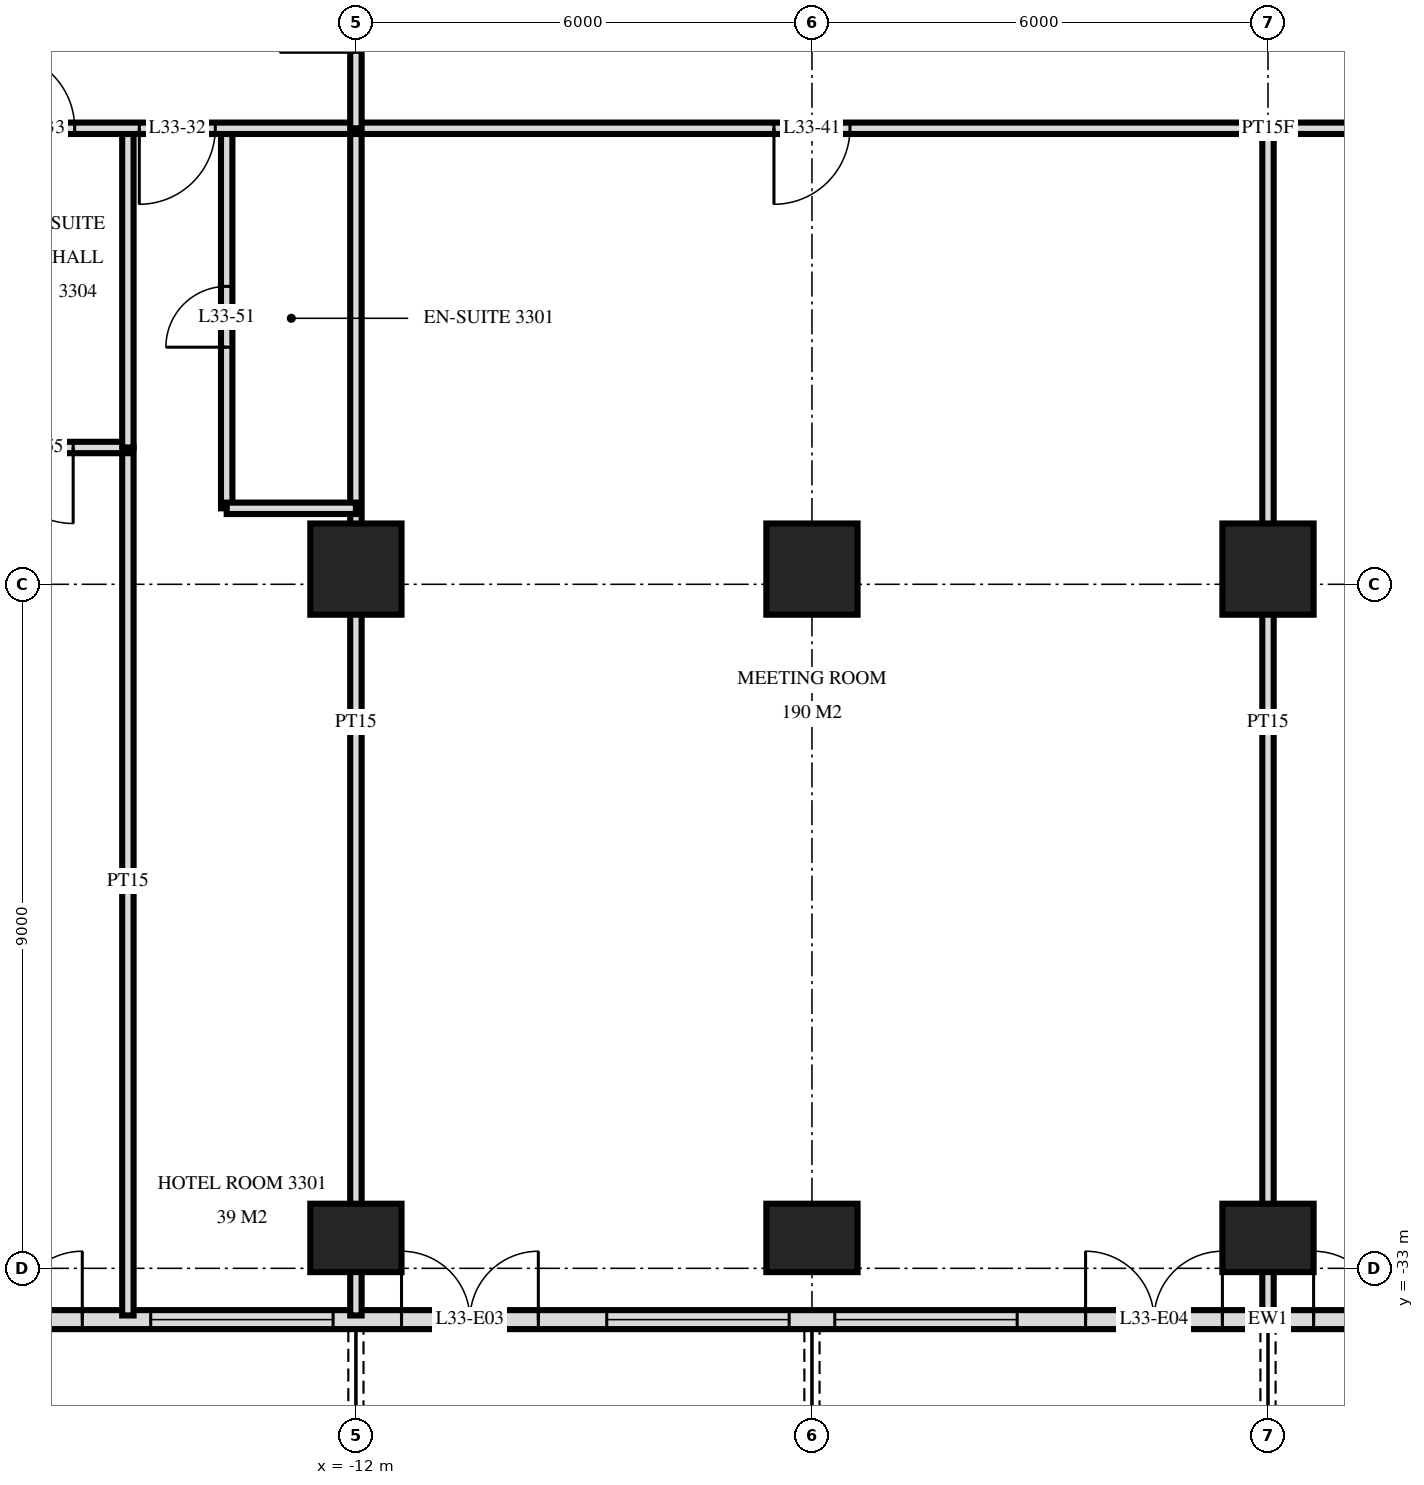
"""IFC4 building model, lengths in metres.
Left out: names, types, materials, properties, quantities, classifications, styles, units other than length and angle.
Written with IfcOpenShell. Run it as: python <this file> out.ifc"""

import sys

from ifc_helpers import new_model, si_unit, direction, frame, frame_2d, origin, origin_2d, place, context, subcontext, project, spatial, rectangle, extrude, element, fill, save


model = new_model("IFC4")
c1 = context("Model", 3, precision=1e-05, world=origin(), true_north=direction((0.0, 1.0)))
c2 = subcontext(c1, "Body", "Model", "MODEL_VIEW")
j1 = project(units=[si_unit("LENGTHUNIT", "METRE"), si_unit("PLANEANGLEUNIT", "RADIAN")], contexts=[c1])
p1 = place(None, origin())
s1 = spatial("IfcSite", under=j1, at=p1, CompositionType="ELEMENT")
p2 = place(p1, origin())
s2 = spatial("IfcBuilding", under=s1, at=p2, CompositionType="ELEMENT")
p3 = place(p2, frame((0.0, 0.0, 130.8)))
s3 = spatial("IfcBuildingStorey", under=s2, at=p3, CompositionType="ELEMENT", Elevation=130.8)
p4 = place(p3, frame((-12.0, -32.6, 0.0), z_axis=(0.0, 0.0, 1.0), x_axis=(1.0, 0.0, 0.0)))
e1 = element("IfcColumn", 1, at=p4, inside=s3, PredefinedType="COLUMN", context=c2, shape_type="SweptSolid", body=[
    extrude(rectangle(XDim=1.2, YDim=0.9, at=origin_2d()), origin(), (0.0, 0.0, 1.0), 3.6),
])
p5 = place(p3, frame((-12.0, -23.8, 0.0), z_axis=(0.0, 0.0, 1.0), x_axis=(1.0, 0.0, 0.0)))
e2 = element("IfcColumn", 2, at=p5, inside=s3, PredefinedType="COLUMN", context=c2, shape_type="SweptSolid", body=[
    extrude(rectangle(XDim=1.2, YDim=1.2, at=origin_2d()), origin(), (0.0, 0.0, 1.0), 3.6),
])
p6 = place(p3, frame((-6.0, -32.6, 0.0), z_axis=(0.0, 0.0, 1.0), x_axis=(1.0, 0.0, 0.0)))
e3 = element("IfcColumn", 3, at=p6, inside=s3, PredefinedType="COLUMN", context=c2, shape_type="SweptSolid", body=[
    extrude(rectangle(XDim=1.2, YDim=0.9, at=origin_2d()), origin(), (0.0, 0.0, 1.0), 3.6),
])
p7 = place(p3, frame((-6.0, -23.8, 0.0), z_axis=(0.0, 0.0, 1.0), x_axis=(1.0, 0.0, 0.0)))
e4 = element("IfcColumn", 4, at=p7, inside=s3, PredefinedType="COLUMN", context=c2, shape_type="SweptSolid", body=[
    extrude(rectangle(XDim=1.2, YDim=1.2, at=origin_2d()), origin(), (0.0, 0.0, 1.0), 3.6),
])
p8 = place(p3, frame((0.0, -32.6, 0.0), z_axis=(0.0, 0.0, 1.0), x_axis=(1.0, 0.0, 0.0)))
e5 = element("IfcColumn", 5, at=p8, inside=s3, PredefinedType="COLUMN", context=c2, shape_type="SweptSolid", body=[
    extrude(rectangle(XDim=1.2, YDim=0.9, at=origin_2d()), origin(), (0.0, 0.0, 1.0), 3.6),
])
p9 = place(p3, frame((0.0, -23.8, 0.0), z_axis=(0.0, 0.0, 1.0), x_axis=(1.0, 0.0, 0.0)))
e6 = element("IfcColumn", 6, at=p9, inside=s3, PredefinedType="COLUMN", context=c2, shape_type="SweptSolid", body=[
    extrude(rectangle(XDim=1.2, YDim=1.2, at=origin_2d()), origin(), (0.0, 0.0, 1.0), 3.6),
])
p10 = place(p3, frame((-23.675, -33.675, 0.0), z_axis=(0.0, 0.0, 1.0), x_axis=(1.0, 0.0, 0.0)))
e7 = element("IfcWall", 7, at=p10, inside=s3, PredefinedType="SOLIDWALL", context=c2, shape_type="SweptSolid", body=[
    extrude(rectangle(XDim=47.351, YDim=0.25, at=frame_2d((23.675, 0.0))), origin(), (0.0, 0.0, 1.0), 3.32),
])
p11 = place(p10, frame((3.425, 0.0, 0.0)))
e8 = element("IfcOpeningElement", 8, at=p11, cuts=e7, PredefinedType="OPENING", context=c2, shape_type="SweptSolid", body=[
    extrude(rectangle(XDim=1.8, YDim=2.4, at=frame_2d((0.9, 1.2))), frame((0.0, 0.135, 0.0), z_axis=(0.0, -1.0, 0.0), x_axis=(1.0, 0.0, 0.0)), (0.0, 0.0, 1.0), 0.27),
])
p12 = place(p10, frame((6.275, 0.0, 0.0)))
e9 = element("IfcOpeningElement", 9, at=p12, cuts=e7, PredefinedType="OPENING", context=c2, shape_type="SweptSolid", body=[
    extrude(rectangle(XDim=1.8, YDim=2.4, at=frame_2d((0.9, 1.2))), frame((0.0, 0.135, 0.0), z_axis=(0.0, -1.0, 0.0), x_axis=(1.0, 0.0, 0.0)), (0.0, 0.0, 1.0), 0.27),
])
p13 = place(p10, frame((8.975, 0.0, 0.3)))
e10 = element("IfcOpeningElement", 10, at=p13, cuts=e7, PredefinedType="OPENING", context=c2, shape_type="SweptSolid", body=[
    extrude(rectangle(XDim=2.4, YDim=2.1, at=frame_2d((1.2, 1.05))), frame((0.0, 0.135, 0.0), z_axis=(0.0, -1.0, 0.0), x_axis=(1.0, 0.0, 0.0)), (0.0, 0.0, 1.0), 0.27),
])
p14 = place(p10, frame((12.275, 0.0, 0.0)))
e11 = element("IfcOpeningElement", 11, at=p14, cuts=e7, PredefinedType="OPENING", context=c2, shape_type="SweptSolid", body=[
    extrude(rectangle(XDim=1.8, YDim=2.4, at=frame_2d((0.9, 1.2))), frame((0.0, 0.135, 0.0), z_axis=(0.0, -1.0, 0.0), x_axis=(1.0, 0.0, 0.0)), (0.0, 0.0, 1.0), 0.27),
])
p15 = place(p10, frame((14.975, 0.0, 0.3)))
e12 = element("IfcOpeningElement", 12, at=p15, cuts=e7, PredefinedType="OPENING", context=c2, shape_type="SweptSolid", body=[
    extrude(rectangle(XDim=2.4, YDim=2.1, at=frame_2d((1.2, 1.05))), frame((0.0, 0.135, 0.0), z_axis=(0.0, -1.0, 0.0), x_axis=(1.0, 0.0, 0.0)), (0.0, 0.0, 1.0), 0.27),
])
p16 = place(p10, frame((17.975, 0.0, 0.3)))
e13 = element("IfcOpeningElement", 13, at=p16, cuts=e7, PredefinedType="OPENING", context=c2, shape_type="SweptSolid", body=[
    extrude(rectangle(XDim=2.4, YDim=2.1, at=frame_2d((1.2, 1.05))), frame((0.0, 0.135, 0.0), z_axis=(0.0, -1.0, 0.0), x_axis=(1.0, 0.0, 0.0)), (0.0, 0.0, 1.0), 0.27),
])
p17 = place(p10, frame((21.275, 0.0, 0.0)))
e14 = element("IfcOpeningElement", 14, at=p17, cuts=e7, PredefinedType="OPENING", context=c2, shape_type="SweptSolid", body=[
    extrude(rectangle(XDim=1.8, YDim=2.4, at=frame_2d((0.9, 1.2))), frame((0.0, 0.135, 0.0), z_axis=(0.0, -1.0, 0.0), x_axis=(1.0, 0.0, 0.0)), (0.0, 0.0, 1.0), 0.27),
])
p18 = place(p10, frame((24.275, 0.0, 0.0)))
e15 = element("IfcOpeningElement", 15, at=p18, cuts=e7, PredefinedType="OPENING", context=c2, shape_type="SweptSolid", body=[
    extrude(rectangle(XDim=1.8, YDim=2.4, at=frame_2d((0.9, 1.2))), frame((0.0, 0.135, 0.0), z_axis=(0.0, -1.0, 0.0), x_axis=(1.0, 0.0, 0.0)), (0.0, 0.0, 1.0), 0.27),
])
p19 = place(p10, frame((26.975, 0.0, 0.3)))
e16 = element("IfcOpeningElement", 16, at=p19, cuts=e7, PredefinedType="OPENING", context=c2, shape_type="SweptSolid", body=[
    extrude(rectangle(XDim=2.4, YDim=2.1, at=frame_2d((1.2, 1.05))), frame((0.0, 0.135, 0.0), z_axis=(0.0, -1.0, 0.0), x_axis=(1.0, 0.0, 0.0)), (0.0, 0.0, 1.0), 0.27),
])
p20 = place(p10, frame((30.275, 0.0, 0.0)))
e17 = element("IfcOpeningElement", 17, at=p20, cuts=e7, PredefinedType="OPENING", context=c2, shape_type="SweptSolid", body=[
    extrude(rectangle(XDim=1.8, YDim=2.4, at=frame_2d((0.9, 1.2))), frame((0.0, 0.135, 0.0), z_axis=(0.0, -1.0, 0.0), x_axis=(1.0, 0.0, 0.0)), (0.0, 0.0, 1.0), 0.27),
])
p21 = place(p10, frame((32.975, 0.0, 0.3)))
e18 = element("IfcOpeningElement", 18, at=p21, cuts=e7, PredefinedType="OPENING", context=c2, shape_type="SweptSolid", body=[
    extrude(rectangle(XDim=2.4, YDim=2.1, at=frame_2d((1.2, 1.05))), frame((0.0, 0.135, 0.0), z_axis=(0.0, -1.0, 0.0), x_axis=(1.0, 0.0, 0.0)), (0.0, 0.0, 1.0), 0.27),
])
p22 = place(p10, frame((36.275, 0.0, 0.0)))
e19 = element("IfcOpeningElement", 19, at=p22, cuts=e7, PredefinedType="OPENING", context=c2, shape_type="SweptSolid", body=[
    extrude(rectangle(XDim=1.8, YDim=2.4, at=frame_2d((0.9, 1.2))), frame((0.0, 0.135, 0.0), z_axis=(0.0, -1.0, 0.0), x_axis=(1.0, 0.0, 0.0)), (0.0, 0.0, 1.0), 0.27),
])
p23 = place(p10, frame((38.975, 0.0, 0.3)))
e20 = element("IfcOpeningElement", 20, at=p23, cuts=e7, PredefinedType="OPENING", context=c2, shape_type="SweptSolid", body=[
    extrude(rectangle(XDim=2.4, YDim=2.1, at=frame_2d((1.2, 1.05))), frame((0.0, 0.135, 0.0), z_axis=(0.0, -1.0, 0.0), x_axis=(1.0, 0.0, 0.0)), (0.0, 0.0, 1.0), 0.27),
])
p24 = place(p10, frame((41.975, 0.0, 0.3)))
e21 = element("IfcOpeningElement", 21, at=p24, cuts=e7, PredefinedType="OPENING", context=c2, shape_type="SweptSolid", body=[
    extrude(rectangle(XDim=2.4, YDim=2.1, at=frame_2d((1.2, 1.05))), frame((0.0, 0.135, 0.0), z_axis=(0.0, -1.0, 0.0), x_axis=(1.0, 0.0, 0.0)), (0.0, 0.0, 1.0), 0.27),
])
p25 = place(p10, frame((45.125, 0.0, 0.0)))
e22 = element("IfcOpeningElement", 22, at=p25, cuts=e7, PredefinedType="OPENING", context=c2, shape_type="SweptSolid", body=[
    extrude(rectangle(XDim=1.8, YDim=2.4, at=frame_2d((0.9, 1.2))), frame((0.0, 0.135, 0.0), z_axis=(0.0, -1.0, 0.0), x_axis=(1.0, 0.0, 0.0)), (0.0, 0.0, 1.0), 0.27),
])
p26 = place(p3, frame((0.0, -33.62, 0.0), z_axis=(0.0, 0.0, 1.0), x_axis=(0.0, 1.0, 0.0)))
e23 = element("IfcWall", 23, at=p26, inside=s3, PredefinedType="PARTITIONING", context=c2, shape_type="SweptSolid", body=[
    extrude(rectangle(XDim=15.62, YDim=0.15, at=frame_2d((7.81, 0.0))), origin(), (0.0, 0.0, 1.0), 3.32),
])
p27 = place(p3, frame((-12.0, -18.0, 0.0), z_axis=(0.0, 0.0, 1.0), x_axis=(0.0, 1.0, 0.0)))
e24 = element("IfcWall", 24, at=p27, inside=s3, PredefinedType="PARTITIONING", context=c2, shape_type="SweptSolid", body=[
    extrude(rectangle(XDim=2.95, YDim=0.15, at=frame_2d((1.475, 0.0))), origin(), (0.0, 0.0, 1.0), 3.32),
])
p28 = place(p27, frame((1.0, 0.0, 0.0)))
e25 = element("IfcOpeningElement", 25, at=p28, cuts=e24, PredefinedType="OPENING", context=c2, shape_type="SweptSolid", body=[
    extrude(rectangle(XDim=1.0, YDim=2.1, at=frame_2d((0.5, 1.05))), frame((0.0, 0.085, 0.0), z_axis=(0.0, -1.0, 0.0), x_axis=(1.0, 0.0, 0.0)), (0.0, 0.0, 1.0), 0.17),
])
p29 = place(p3, frame((-12.0, -33.62, 0.0), z_axis=(0.0, 0.0, 1.0), x_axis=(0.0, 1.0, 0.0)))
e26 = element("IfcWall", 26, at=p29, inside=s3, PredefinedType="PARTITIONING", context=c2, shape_type="SweptSolid", body=[
    extrude(rectangle(XDim=15.62, YDim=0.15, at=frame_2d((7.81, 0.0))), origin(), (0.0, 0.0, 1.0), 3.32),
])
p30 = place(p3, frame((-13.7, -23.0, 0.0), z_axis=(0.0, 0.0, 1.0), x_axis=(0.0, 1.0, 0.0)))
e27 = element("IfcWall", 27, at=p30, inside=s3, PredefinedType="PARTITIONING", context=c2, shape_type="SweptSolid", body=[
    extrude(rectangle(XDim=5.0, YDim=0.15, at=frame_2d((2.5, 0.0))), origin(), (0.0, 0.0, 1.0), 3.32),
])
p31 = place(p30, frame((2.12, 0.0, 0.0)))
e28 = element("IfcOpeningElement", 28, at=p31, cuts=e27, PredefinedType="OPENING", context=c2, shape_type="SweptSolid", body=[
    extrude(rectangle(XDim=0.8, YDim=2.1, at=frame_2d((0.4, 1.05))), frame((0.0, 0.085, 0.0), z_axis=(0.0, -1.0, 0.0), x_axis=(1.0, 0.0, 0.0)), (0.0, 0.0, 1.0), 0.17),
])
p32 = place(p3, frame((-15.0, -22.2, 0.0), z_axis=(0.0, 0.0, 1.0), x_axis=(0.0, 1.0, 0.0)))
e29 = element("IfcWall", 29, at=p32, inside=s3, PredefinedType="PARTITIONING", context=c2, shape_type="SweptSolid", body=[
    extrude(rectangle(XDim=4.2, YDim=0.15, at=frame_2d((2.1, 0.0))), origin(), (0.0, 0.0, 1.0), 3.32),
])
p33 = place(p3, frame((-15.0, -33.62, 0.0), z_axis=(0.0, 0.0, 1.0), x_axis=(0.0, 1.0, 0.0)))
e30 = element("IfcWall", 30, at=p33, inside=s3, PredefinedType="PARTITIONING", context=c2, shape_type="SweptSolid", body=[
    extrude(rectangle(XDim=11.42, YDim=0.15, at=frame_2d((5.71, 0.0))), origin(), (0.0, 0.0, 1.0), 3.32),
])
p34 = place(p3, frame((-13.7, -23.0, 0.0), z_axis=(0.0, 0.0, 1.0), x_axis=(1.0, 0.0, 0.0)))
e31 = element("IfcWall", 31, at=p34, inside=s3, PredefinedType="PARTITIONING", context=c2, shape_type="SweptSolid", body=[
    extrude(rectangle(XDim=1.7, YDim=0.15, at=frame_2d((0.85, 0.0))), origin(), (0.0, 0.0, 1.0), 3.32),
])
p35 = place(p3, frame((-17.4, -22.2, 0.0), z_axis=(0.0, 0.0, 1.0), x_axis=(1.0, 0.0, 0.0)))
e32 = element("IfcWall", 32, at=p35, inside=s3, PredefinedType="PARTITIONING", context=c2, shape_type="SweptSolid", body=[
    extrude(rectangle(XDim=2.4, YDim=0.15, at=frame_2d((1.2, 0.0))), origin(), (0.0, 0.0, 1.0), 3.32),
])
p36 = place(p35, frame((0.68, 0.0, 0.0)))
e33 = element("IfcOpeningElement", 33, at=p36, cuts=e32, PredefinedType="OPENING", context=c2, shape_type="SweptSolid", body=[
    extrude(rectangle(XDim=1.0, YDim=2.1, at=frame_2d((0.5, 1.05))), frame((0.0, 0.085, 0.0), z_axis=(0.0, -1.0, 0.0), x_axis=(1.0, 0.0, 0.0)), (0.0, 0.0, 1.0), 0.17),
])
p37 = place(p3, frame((-28.02, -18.0, 0.0), z_axis=(0.0, 0.0, 1.0), x_axis=(1.0, 0.0, 0.0)))
e34 = element("IfcWall", 34, at=p37, inside=s3, PredefinedType="PARTITIONING", context=c2, shape_type="SweptSolid", body=[
    extrude(rectangle(XDim=56.04, YDim=0.15, at=frame_2d((28.02, 0.0))), origin(), (0.0, 0.0, 1.0), 3.32),
])
p38 = place(p37, frame((13.17, 0.0, 0.0)))
e35 = element("IfcOpeningElement", 35, at=p38, cuts=e34, PredefinedType="OPENING", context=c2, shape_type="SweptSolid", body=[
    extrude(rectangle(XDim=1.0, YDim=2.1, at=frame_2d((0.5, 1.05))), frame((0.0, 0.085, 0.0), z_axis=(0.0, -1.0, 0.0), x_axis=(1.0, 0.0, 0.0)), (0.0, 0.0, 1.0), 0.17),
])
p39 = place(p37, frame((11.32, 0.0, 0.0)))
e36 = element("IfcOpeningElement", 36, at=p39, cuts=e34, PredefinedType="OPENING", context=c2, shape_type="SweptSolid", body=[
    extrude(rectangle(XDim=1.0, YDim=2.1, at=frame_2d((0.5, 1.05))), frame((0.0, 0.085, 0.0), z_axis=(0.0, -1.0, 0.0), x_axis=(1.0, 0.0, 0.0)), (0.0, 0.0, 1.0), 0.17),
])
p40 = place(p37, frame((41.87, 0.0, 0.0)))
e37 = element("IfcOpeningElement", 37, at=p40, cuts=e34, PredefinedType="OPENING", context=c2, shape_type="SweptSolid", body=[
    extrude(rectangle(XDim=1.0, YDim=2.1, at=frame_2d((0.5, 1.05))), frame((0.0, 0.085, 0.0), z_axis=(0.0, -1.0, 0.0), x_axis=(1.0, 0.0, 0.0)), (0.0, 0.0, 1.0), 0.17),
])
p41 = place(p37, frame((43.17, 0.0, 0.0)))
e38 = element("IfcOpeningElement", 38, at=p41, cuts=e34, PredefinedType="OPENING", context=c2, shape_type="SweptSolid", body=[
    extrude(rectangle(XDim=1.0, YDim=2.1, at=frame_2d((0.5, 1.05))), frame((0.0, 0.085, 0.0), z_axis=(0.0, -1.0, 0.0), x_axis=(1.0, 0.0, 0.0)), (0.0, 0.0, 1.0), 0.17),
])
p42 = place(p37, frame((46.72, 0.0, 0.0)))
e39 = element("IfcOpeningElement", 39, at=p42, cuts=e34, PredefinedType="OPENING", context=c2, shape_type="SweptSolid", body=[
    extrude(rectangle(XDim=1.0, YDim=2.1, at=frame_2d((0.5, 1.05))), frame((0.0, 0.085, 0.0), z_axis=(0.0, -1.0, 0.0), x_axis=(1.0, 0.0, 0.0)), (0.0, 0.0, 1.0), 0.17),
])
p43 = place(p37, frame((21.52, 0.0, 0.0)))
e40 = element("IfcOpeningElement", 40, at=p43, cuts=e34, PredefinedType="OPENING", context=c2, shape_type="SweptSolid", body=[
    extrude(rectangle(XDim=1.0, YDim=2.1, at=frame_2d((0.5, 1.05))), frame((0.0, 0.085, 0.0), z_axis=(0.0, -1.0, 0.0), x_axis=(1.0, 0.0, 0.0)), (0.0, 0.0, 1.0), 0.17),
])
p44 = place(p37, frame((33.52, 0.0, 0.0)))
e41 = element("IfcOpeningElement", 41, at=p44, cuts=e34, PredefinedType="OPENING", context=c2, shape_type="SweptSolid", body=[
    extrude(rectangle(XDim=1.0, YDim=2.1, at=frame_2d((0.5, 1.05))), frame((0.0, 0.085, 0.0), z_axis=(0.0, -1.0, 0.0), x_axis=(1.0, 0.0, 0.0)), (0.0, 0.0, 1.0), 0.17),
])
p45 = place(p12, origin())
e42 = element("IfcDoor", 42, at=p45, inside=s3, OperationType="DOUBLE_DOOR_SINGLE_SWING", PredefinedType="DOOR", context=c2, shape_type="SweptSolid", body=[
    extrude(rectangle(XDim=1.8, YDim=2.4, at=frame_2d((0.9, 1.2))), frame((0.0, 0.025, 0.0), z_axis=(0.0, -1.0, 0.0), x_axis=(1.0, 0.0, 0.0)), (0.0, 0.0, 1.0), 0.05),
])
fill(e9, e42)
p46 = place(p13, origin())
e43 = element("IfcWindow", 43, at=p46, inside=s3, PartitioningType="SINGLE_PANEL", PredefinedType="WINDOW", context=c2, shape_type="SweptSolid", body=[
    extrude(rectangle(XDim=2.4, YDim=2.1, at=frame_2d((1.2, 1.05))), frame((0.0, 0.03, 0.0), z_axis=(0.0, -1.0, 0.0), x_axis=(1.0, 0.0, 0.0)), (0.0, 0.0, 1.0), 0.06),
])
fill(e10, e43)
p47 = place(p14, origin())
e44 = element("IfcDoor", 44, at=p47, inside=s3, OperationType="DOUBLE_DOOR_SINGLE_SWING", PredefinedType="DOOR", context=c2, shape_type="SweptSolid", body=[
    extrude(rectangle(XDim=1.8, YDim=2.4, at=frame_2d((0.9, 1.2))), frame((0.0, 0.025, 0.0), z_axis=(0.0, -1.0, 0.0), x_axis=(1.0, 0.0, 0.0)), (0.0, 0.0, 1.0), 0.05),
])
fill(e11, e44)
p48 = place(p15, origin())
e45 = element("IfcWindow", 45, at=p48, inside=s3, PartitioningType="SINGLE_PANEL", PredefinedType="WINDOW", context=c2, shape_type="SweptSolid", body=[
    extrude(rectangle(XDim=2.4, YDim=2.1, at=frame_2d((1.2, 1.05))), frame((0.0, 0.03, 0.0), z_axis=(0.0, -1.0, 0.0), x_axis=(1.0, 0.0, 0.0)), (0.0, 0.0, 1.0), 0.06),
])
fill(e12, e45)
p49 = place(p16, origin())
e46 = element("IfcWindow", 46, at=p49, inside=s3, PartitioningType="SINGLE_PANEL", PredefinedType="WINDOW", context=c2, shape_type="SweptSolid", body=[
    extrude(rectangle(XDim=2.4, YDim=2.1, at=frame_2d((1.2, 1.05))), frame((0.0, 0.03, 0.0), z_axis=(0.0, -1.0, 0.0), x_axis=(1.0, 0.0, 0.0)), (0.0, 0.0, 1.0), 0.06),
])
fill(e13, e46)
p50 = place(p17, origin())
e47 = element("IfcDoor", 47, at=p50, inside=s3, OperationType="DOUBLE_DOOR_SINGLE_SWING", PredefinedType="DOOR", context=c2, shape_type="SweptSolid", body=[
    extrude(rectangle(XDim=1.8, YDim=2.4, at=frame_2d((0.9, 1.2))), frame((0.0, 0.025, 0.0), z_axis=(0.0, -1.0, 0.0), x_axis=(1.0, 0.0, 0.0)), (0.0, 0.0, 1.0), 0.05),
])
fill(e14, e47)
p51 = place(p18, origin())
e48 = element("IfcDoor", 48, at=p51, inside=s3, OperationType="DOUBLE_DOOR_SINGLE_SWING", PredefinedType="DOOR", context=c2, shape_type="SweptSolid", body=[
    extrude(rectangle(XDim=1.8, YDim=2.4, at=frame_2d((0.9, 1.2))), frame((0.0, 0.025, 0.0), z_axis=(0.0, -1.0, 0.0), x_axis=(1.0, 0.0, 0.0)), (0.0, 0.0, 1.0), 0.05),
])
fill(e15, e48)
p52 = place(p38, frame((0.5, 0.0, 0.0), z_axis=(0.0, 0.0, 1.0), x_axis=(-1.0, 0.0, 0.0)))
e49 = element("IfcDoor", 49, at=p52, inside=s3, OperationType="SINGLE_SWING_LEFT", PredefinedType="DOOR", context=c2, shape_type="SweptSolid", body=[
    extrude(rectangle(XDim=1.0, YDim=2.1, at=frame_2d((0.0, 1.05))), frame((0.0, -0.025, 0.0), z_axis=(0.0, 1.0, 0.0), x_axis=(-1.0, 0.0, 0.0)), (0.0, 0.0, 1.0), 0.05),
])
fill(e35, e49)
p53 = place(p39, origin())
e50 = element("IfcDoor", 50, at=p53, inside=s3, OperationType="SINGLE_SWING_RIGHT", PredefinedType="DOOR", context=c2, shape_type="SweptSolid", body=[
    extrude(rectangle(XDim=1.0, YDim=2.1, at=frame_2d((0.5, 1.05))), frame((0.0, 0.025, 0.0), z_axis=(0.0, -1.0, 0.0), x_axis=(1.0, 0.0, 0.0)), (0.0, 0.0, 1.0), 0.05),
])
fill(e36, e50)
p54 = place(p43, frame((0.5, 0.0, 0.0), z_axis=(0.0, 0.0, 1.0), x_axis=(-1.0, 0.0, 0.0)))
e51 = element("IfcDoor", 51, at=p54, inside=s3, OperationType="SINGLE_SWING_LEFT", PredefinedType="DOOR", context=c2, shape_type="SweptSolid", body=[
    extrude(rectangle(XDim=1.0, YDim=2.1, at=frame_2d((0.0, 1.05))), frame((0.0, -0.025, 0.0), z_axis=(0.0, 1.0, 0.0), x_axis=(-1.0, 0.0, 0.0)), (0.0, 0.0, 1.0), 0.05),
])
fill(e40, e51)
p55 = place(p31, origin())
e52 = element("IfcDoor", 52, at=p55, inside=s3, OperationType="SINGLE_SWING_RIGHT", PredefinedType="DOOR", context=c2, shape_type="SweptSolid", body=[
    extrude(rectangle(XDim=0.8, YDim=2.1, at=frame_2d((0.4, 1.05))), frame((0.0, 0.025, 0.0), z_axis=(0.0, -1.0, 0.0), x_axis=(1.0, 0.0, 0.0)), (0.0, 0.0, 1.0), 0.05),
])
fill(e28, e52)
p56 = place(p36, frame((0.5, 0.0, 0.0), z_axis=(0.0, 0.0, 1.0), x_axis=(-1.0, 0.0, 0.0)))
e53 = element("IfcDoor", 53, at=p56, inside=s3, OperationType="SINGLE_SWING_RIGHT", PredefinedType="DOOR", context=c2, shape_type="SweptSolid", body=[
    extrude(rectangle(XDim=1.0, YDim=2.1, at=frame_2d((0.0, 1.05))), frame((0.0, -0.025, 0.0), z_axis=(0.0, 1.0, 0.0), x_axis=(-1.0, 0.0, 0.0)), (0.0, 0.0, 1.0), 0.05),
])
fill(e33, e53)
save(model, sys.argv[1])
